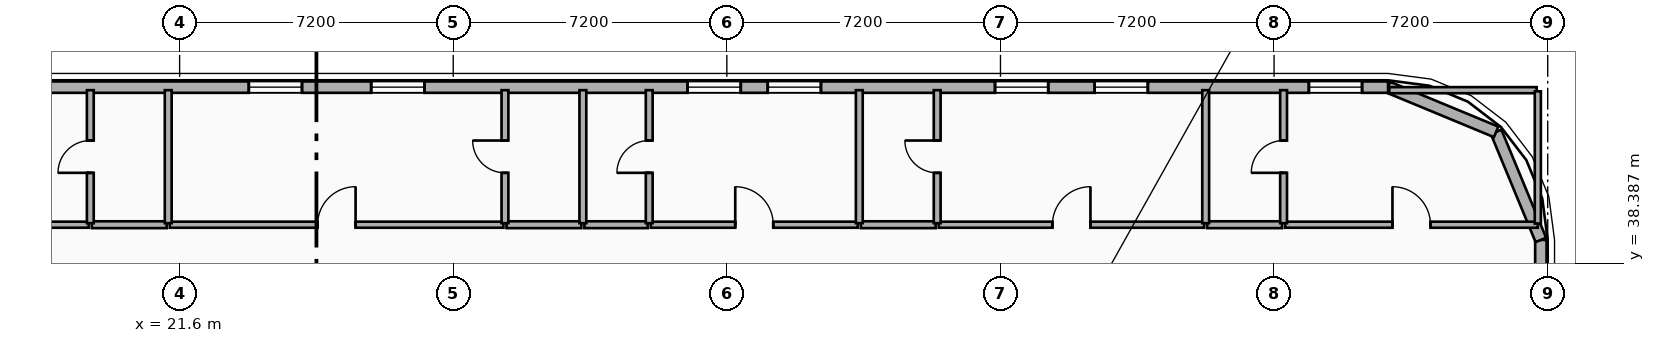
"""IFC4 building model, lengths in metres.
Left out: names, types, materials, properties, quantities, classifications, styles, units other than length and angle.
Written with IfcOpenShell. Run it as: python <this file> out.ifc"""

import sys

from ifc_helpers import new_model, si_unit, direction, frame, frame_2d, origin, place, context, subcontext, project, spatial, rectangle, extrude, element, fill, save


model = new_model("IFC4")
c1 = context("Model", 3, precision=1e-05, world=origin(), true_north=direction((0.0, 1.0)))
c2 = subcontext(c1, "Body", "Model", "MODEL_VIEW")
j1 = project(units=[si_unit("LENGTHUNIT", "METRE"), si_unit("PLANEANGLEUNIT", "RADIAN")], contexts=[c1])
p1 = place(None, origin())
s1 = spatial("IfcSite", under=j1, at=p1, CompositionType="ELEMENT")
p2 = place(p1, origin())
s2 = spatial("IfcBuilding", under=s1, at=p2, CompositionType="ELEMENT")
p3 = place(p2, frame((0.0, 0.0, 111.8)))
s3 = spatial("IfcBuildingStorey", under=s2, at=p3, CompositionType="ELEMENT", Elevation=111.8)
p4 = place(p3, frame((57.42, 39.0, 0.0), z_axis=(0.0, 0.0, 1.0), x_axis=(0.0, -1.0, 0.0)))
e1 = element("IfcWall", 1, at=p4, inside=s3, PredefinedType="SOLIDWALL", context=c2, shape_type="SweptSolid", body=[
    extrude(rectangle(XDim=18.0, YDim=0.3, at=frame_2d((9.0, 0.0))), origin(), (0.0, 0.0, 1.0), 3.24),
])
p5 = place(p4, frame((8.882, 0.0, 0.48)))
e2 = element("IfcOpeningElement", 2, at=p5, cuts=e1, PredefinedType="OPENING", context=c2, shape_type="SweptSolid", body=[
    extrude(rectangle(XDim=1.4, YDim=1.8, at=frame_2d((0.7, 0.9))), frame((0.0, 0.16, 0.0), z_axis=(0.0, -1.0, 0.0), x_axis=(1.0, 0.0, 0.0)), (0.0, 0.0, 1.0), 0.32),
])
p6 = place(p4, frame((3.621, 0.0, 0.48)))
e3 = element("IfcOpeningElement", 3, at=p6, cuts=e1, PredefinedType="OPENING", context=c2, shape_type="SweptSolid", body=[
    extrude(rectangle(XDim=1.4, YDim=1.8, at=frame_2d((0.7, 0.9))), frame((0.0, 0.16, 0.0), z_axis=(0.0, -1.0, 0.0), x_axis=(1.0, 0.0, 0.0)), (0.0, 0.0, 1.0), 0.32),
])
p7 = place(p3, frame((56.243, 41.843, 0.0), z_axis=(0.0, 0.0, 1.0), x_axis=(0.382636798336, -0.92389884758, 0.0)))
e4 = element("IfcWall", 4, at=p7, inside=s3, PredefinedType="SOLIDWALL", context=c2, shape_type="SweptSolid", body=[
    extrude(rectangle(XDim=3.077, YDim=0.3, at=frame_2d((1.538, 0.0))), origin(), (0.0, 0.0, 1.0), 3.24),
])
p8 = place(p3, frame((53.4, 43.02, 0.0), z_axis=(0.0, 0.0, 1.0), x_axis=(0.923882414032, -0.382676475685, 0.0)))
e5 = element("IfcWall", 5, at=p8, inside=s3, PredefinedType="SOLIDWALL", context=c2, shape_type="SweptSolid", body=[
    extrude(rectangle(XDim=3.077, YDim=0.3, at=frame_2d((1.539, 0.0))), origin(), (0.0, 0.0, 1.0), 3.24),
])
p9 = place(p3, frame((4.2, 43.02, 0.0), z_axis=(0.0, 0.0, 1.0), x_axis=(1.0, 0.0, 0.0)))
e6 = element("IfcWall", 6, at=p9, inside=s3, PredefinedType="SOLIDWALL", context=c2, shape_type="SweptSolid", body=[
    extrude(rectangle(XDim=49.2, YDim=0.3, at=frame_2d((24.6, 0.0))), origin(), (0.0, 0.0, 1.0), 3.24),
])
p10 = place(p9, frame((8.09, 0.0, 0.85)))
e7 = element("IfcOpeningElement", 7, at=p10, cuts=e6, PredefinedType="OPENING", context=c2, shape_type="SweptSolid", body=[
    extrude(rectangle(XDim=1.4, YDim=1.8, at=frame_2d((0.7, 0.9))), frame((0.0, 0.16, 0.0), z_axis=(0.0, -1.0, 0.0), x_axis=(1.0, 0.0, 0.0)), (0.0, 0.0, 1.0), 0.32),
])
p11 = place(p9, frame((11.42, 0.0, 0.85)))
e8 = element("IfcOpeningElement", 8, at=p11, cuts=e6, PredefinedType="OPENING", context=c2, shape_type="SweptSolid", body=[
    extrude(rectangle(XDim=1.4, YDim=1.8, at=frame_2d((0.7, 0.9))), frame((0.0, 0.16, 0.0), z_axis=(0.0, -1.0, 0.0), x_axis=(1.0, 0.0, 0.0)), (0.0, 0.0, 1.0), 0.32),
])
p12 = place(p9, frame((19.22, 0.0, 0.85)))
e9 = element("IfcOpeningElement", 9, at=p12, cuts=e6, PredefinedType="OPENING", context=c2, shape_type="SweptSolid", body=[
    extrude(rectangle(XDim=1.4, YDim=1.8, at=frame_2d((0.7, 0.9))), frame((0.0, 0.16, 0.0), z_axis=(0.0, -1.0, 0.0), x_axis=(1.0, 0.0, 0.0)), (0.0, 0.0, 1.0), 0.32),
])
p13 = place(p9, frame((22.441, 0.0, 0.85)))
e10 = element("IfcOpeningElement", 10, at=p13, cuts=e6, PredefinedType="OPENING", context=c2, shape_type="SweptSolid", body=[
    extrude(rectangle(XDim=1.4, YDim=1.8, at=frame_2d((0.7, 0.9))), frame((0.0, 0.16, 0.0), z_axis=(0.0, -1.0, 0.0), x_axis=(1.0, 0.0, 0.0)), (0.0, 0.0, 1.0), 0.32),
])
p14 = place(p9, frame((30.766, 0.0, 0.85)))
e11 = element("IfcOpeningElement", 11, at=p14, cuts=e6, PredefinedType="OPENING", context=c2, shape_type="SweptSolid", body=[
    extrude(rectangle(XDim=1.4, YDim=1.8, at=frame_2d((0.7, 0.9))), frame((0.0, 0.16, 0.0), z_axis=(0.0, -1.0, 0.0), x_axis=(1.0, 0.0, 0.0)), (0.0, 0.0, 1.0), 0.32),
])
p15 = place(p9, frame((32.876, 0.0, 0.85)))
e12 = element("IfcOpeningElement", 12, at=p15, cuts=e6, PredefinedType="OPENING", context=c2, shape_type="SweptSolid", body=[
    extrude(rectangle(XDim=1.4, YDim=1.8, at=frame_2d((0.7, 0.9))), frame((0.0, 0.16, 0.0), z_axis=(0.0, -1.0, 0.0), x_axis=(1.0, 0.0, 0.0)), (0.0, 0.0, 1.0), 0.32),
])
p16 = place(p9, frame((38.857, 0.0, 0.85)))
e13 = element("IfcOpeningElement", 13, at=p16, cuts=e6, PredefinedType="OPENING", context=c2, shape_type="SweptSolid", body=[
    extrude(rectangle(XDim=1.4, YDim=1.8, at=frame_2d((0.7, 0.9))), frame((0.0, 0.16, 0.0), z_axis=(0.0, -1.0, 0.0), x_axis=(1.0, 0.0, 0.0)), (0.0, 0.0, 1.0), 0.32),
])
p17 = place(p9, frame((41.478, 0.0, 0.85)))
e14 = element("IfcOpeningElement", 14, at=p17, cuts=e6, PredefinedType="OPENING", context=c2, shape_type="SweptSolid", body=[
    extrude(rectangle(XDim=1.4, YDim=1.8, at=frame_2d((0.7, 0.9))), frame((0.0, 0.16, 0.0), z_axis=(0.0, -1.0, 0.0), x_axis=(1.0, 0.0, 0.0)), (0.0, 0.0, 1.0), 0.32),
])
p18 = place(p9, frame((47.115, 0.0, 0.85)))
e15 = element("IfcOpeningElement", 15, at=p18, cuts=e6, PredefinedType="OPENING", context=c2, shape_type="SweptSolid", body=[
    extrude(rectangle(XDim=1.4, YDim=1.8, at=frame_2d((0.7, 0.9))), frame((0.0, 0.16, 0.0), z_axis=(0.0, -1.0, 0.0), x_axis=(1.0, 0.0, 0.0)), (0.0, 0.0, 1.0), 0.32),
])
p19 = place(p3, frame((10.1, 39.4, 0.0), z_axis=(0.0, 0.0, 1.0), x_axis=(1.0, 0.0, 0.0)))
e16 = element("IfcWall", 16, at=p19, inside=s3, PredefinedType="PARTITIONING", context=c2, shape_type="SweptSolid", body=[
    extrude(rectangle(XDim=9.11, YDim=0.16, at=frame_2d((4.555, 0.0))), origin(), (0.0, 0.0, 1.0), 3.24),
])
p20 = place(p19, frame((4.055, 0.0, 0.0)))
e17 = element("IfcOpeningElement", 17, at=p20, cuts=e16, PredefinedType="OPENING", context=c2, shape_type="SweptSolid", body=[
    extrude(rectangle(XDim=1.0, YDim=2.15, at=frame_2d((0.5, 1.075))), frame((0.0, 0.09, 0.0), z_axis=(0.0, -1.0, 0.0), x_axis=(1.0, 0.0, 0.0)), (0.0, 0.0, 1.0), 0.18),
])
p21 = place(p3, frame((19.29, 39.4, 0.0), z_axis=(0.0, 0.0, 1.0), x_axis=(1.0, 0.0, 0.0)))
e18 = element("IfcWall", 18, at=p21, inside=s3, PredefinedType="PLUMBINGWALL", context=c2, shape_type="SweptSolid", body=[
    extrude(rectangle(XDim=1.97, YDim=0.18, at=frame_2d((0.985, 0.0))), origin(), (0.0, 0.0, 1.0), 3.24),
])
p22 = place(p3, frame((21.34, 39.4, 0.0), z_axis=(0.0, 0.0, 1.0), x_axis=(1.0, 0.0, 0.0)))
e19 = element("IfcWall", 19, at=p22, inside=s3, PredefinedType="PARTITIONING", context=c2, shape_type="SweptSolid", body=[
    extrude(rectangle(XDim=8.781, YDim=0.16, at=frame_2d((4.391, 0.0))), origin(), (0.0, 0.0, 1.0), 3.24),
])
p23 = place(p22, frame((3.89, 0.0, 0.0)))
e20 = element("IfcOpeningElement", 20, at=p23, cuts=e19, PredefinedType="OPENING", context=c2, shape_type="SweptSolid", body=[
    extrude(rectangle(XDim=1.0, YDim=2.15, at=frame_2d((0.5, 1.075))), frame((0.0, 0.09, 0.0), z_axis=(0.0, -1.0, 0.0), x_axis=(1.0, 0.0, 0.0)), (0.0, 0.0, 1.0), 0.18),
])
p24 = place(p3, frame((30.201, 39.4, 0.0), z_axis=(0.0, 0.0, 1.0), x_axis=(1.0, 0.0, 0.0)))
e21 = element("IfcWall", 21, at=p24, inside=s3, PredefinedType="PLUMBINGWALL", context=c2, shape_type="SweptSolid", body=[
    extrude(rectangle(XDim=1.97, YDim=0.18, at=frame_2d((0.985, 0.0))), origin(), (0.0, 0.0, 1.0), 3.24),
])
p25 = place(p3, frame((33.997, 39.4, 0.0), z_axis=(0.0, 0.0, 1.0), x_axis=(1.0, 0.0, 0.0)))
e22 = element("IfcWall", 22, at=p25, inside=s3, PredefinedType="PARTITIONING", context=c2, shape_type="SweptSolid", body=[
    extrude(rectangle(XDim=5.448, YDim=0.16, at=frame_2d((2.724, 0.0))), origin(), (0.0, 0.0, 1.0), 3.24),
])
p26 = place(p25, frame((2.224, 0.0, 0.0)))
e23 = element("IfcOpeningElement", 23, at=p26, cuts=e22, PredefinedType="OPENING", context=c2, shape_type="SweptSolid", body=[
    extrude(rectangle(XDim=1.0, YDim=2.15, at=frame_2d((0.5, 1.075))), frame((0.0, 0.09, 0.0), z_axis=(0.0, -1.0, 0.0), x_axis=(1.0, 0.0, 0.0)), (0.0, 0.0, 1.0), 0.18),
])
p27 = place(p3, frame((32.251, 39.4, 0.0), z_axis=(0.0, 0.0, 1.0), x_axis=(1.0, 0.0, 0.0)))
e24 = element("IfcWall", 24, at=p27, inside=s3, PredefinedType="PLUMBINGWALL", context=c2, shape_type="SweptSolid", body=[
    extrude(rectangle(XDim=1.666, YDim=0.18, at=frame_2d((0.833, 0.0))), origin(), (0.0, 0.0, 1.0), 3.24),
])
p28 = place(p3, frame((41.575, 39.4, 0.0), z_axis=(0.0, 0.0, 1.0), x_axis=(1.0, 0.0, 0.0)))
e25 = element("IfcWall", 25, at=p28, inside=s3, PredefinedType="PARTITIONING", context=c2, shape_type="SweptSolid", body=[
    extrude(rectangle(XDim=6.985, YDim=0.16, at=frame_2d((3.493, 0.0))), origin(), (0.0, 0.0, 1.0), 3.24),
])
p29 = place(p28, frame((2.992, 0.0, 0.0)))
e26 = element("IfcOpeningElement", 26, at=p29, cuts=e25, PredefinedType="OPENING", context=c2, shape_type="SweptSolid", body=[
    extrude(rectangle(XDim=1.0, YDim=2.15, at=frame_2d((0.5, 1.075))), frame((0.0, 0.09, 0.0), z_axis=(0.0, -1.0, 0.0), x_axis=(1.0, 0.0, 0.0)), (0.0, 0.0, 1.0), 0.18),
])
p30 = place(p3, frame((39.525, 39.4, 0.0), z_axis=(0.0, 0.0, 1.0), x_axis=(1.0, 0.0, 0.0)))
e27 = element("IfcWall", 27, at=p30, inside=s3, PredefinedType="PLUMBINGWALL", context=c2, shape_type="SweptSolid", body=[
    extrude(rectangle(XDim=1.97, YDim=0.18, at=frame_2d((0.985, 0.0))), origin(), (0.0, 0.0, 1.0), 3.24),
])
p31 = place(p3, frame((50.69, 39.4, 0.0), z_axis=(0.0, 0.0, 1.0), x_axis=(1.0, 0.0, 0.0)))
e28 = element("IfcWall", 28, at=p31, inside=s3, PredefinedType="PARTITIONING", context=c2, shape_type="SweptSolid", body=[
    extrude(rectangle(XDim=6.65, YDim=0.16, at=frame_2d((3.325, 0.0))), origin(), (0.0, 0.0, 1.0), 3.24),
])
p32 = place(p31, frame((2.825, 0.0, 0.0)))
e29 = element("IfcOpeningElement", 29, at=p32, cuts=e28, PredefinedType="OPENING", context=c2, shape_type="SweptSolid", body=[
    extrude(rectangle(XDim=1.0, YDim=2.15, at=frame_2d((0.5, 1.075))), frame((0.0, 0.09, 0.0), z_axis=(0.0, -1.0, 0.0), x_axis=(1.0, 0.0, 0.0)), (0.0, 0.0, 1.0), 0.18),
])
p33 = place(p3, frame((48.64, 39.4, 0.0), z_axis=(0.0, 0.0, 1.0), x_axis=(1.0, 0.0, 0.0)))
e30 = element("IfcWall", 30, at=p33, inside=s3, PredefinedType="PLUMBINGWALL", context=c2, shape_type="SweptSolid", body=[
    extrude(rectangle(XDim=1.97, YDim=0.18, at=frame_2d((0.985, 0.0))), origin(), (0.0, 0.0, 1.0), 3.24),
])
p34 = place(p3, frame((19.25, 39.44, 0.0), z_axis=(0.0, 0.0, 1.0), x_axis=(0.0, 1.0, 0.0)))
e31 = element("IfcWall", 31, at=p34, inside=s3, PredefinedType="PLUMBINGWALL", context=c2, shape_type="SweptSolid", body=[
    extrude(rectangle(XDim=3.5, YDim=0.18, at=frame_2d((1.75, 0.0))), origin(), (0.0, 0.0, 1.0), 3.24),
])
p35 = place(p34, frame((1.325, 0.0, 0.0)))
e32 = element("IfcOpeningElement", 32, at=p35, cuts=e31, PredefinedType="OPENING", context=c2, shape_type="SweptSolid", body=[
    extrude(rectangle(XDim=0.85, YDim=2.1, at=frame_2d((0.425, 1.05))), frame((0.0, 0.1, 0.0), z_axis=(0.0, -1.0, 0.0), x_axis=(1.0, 0.0, 0.0)), (0.0, 0.0, 1.0), 0.2),
])
p36 = place(p3, frame((21.3, 39.44, 0.0), z_axis=(0.0, 0.0, 1.0), x_axis=(0.0, 1.0, 0.0)))
e33 = element("IfcWall", 33, at=p36, inside=s3, PredefinedType="PLUMBINGWALL", context=c2, shape_type="SweptSolid", body=[
    extrude(rectangle(XDim=3.5, YDim=0.18, at=frame_2d((1.75, 0.0))), origin(), (0.0, 0.0, 1.0), 3.24),
])
p37 = place(p3, frame((30.161, 39.44, 0.0), z_axis=(0.0, 0.0, 1.0), x_axis=(0.0, 1.0, 0.0)))
e34 = element("IfcWall", 34, at=p37, inside=s3, PredefinedType="PLUMBINGWALL", context=c2, shape_type="SweptSolid", body=[
    extrude(rectangle(XDim=3.5, YDim=0.18, at=frame_2d((1.75, 0.0))), origin(), (0.0, 0.0, 1.0), 3.24),
])
p38 = place(p37, frame((1.325, 0.0, 0.0)))
e35 = element("IfcOpeningElement", 35, at=p38, cuts=e34, PredefinedType="OPENING", context=c2, shape_type="SweptSolid", body=[
    extrude(rectangle(XDim=0.85, YDim=2.1, at=frame_2d((0.425, 1.05))), frame((0.0, 0.1, 0.0), z_axis=(0.0, -1.0, 0.0), x_axis=(1.0, 0.0, 0.0)), (0.0, 0.0, 1.0), 0.2),
])
p39 = place(p3, frame((32.211, 39.44, 0.0), z_axis=(0.0, 0.0, 1.0), x_axis=(0.0, 1.0, 0.0)))
e36 = element("IfcWall", 36, at=p39, inside=s3, PredefinedType="PLUMBINGWALL", context=c2, shape_type="SweptSolid", body=[
    extrude(rectangle(XDim=3.5, YDim=0.18, at=frame_2d((1.75, 0.0))), origin(), (0.0, 0.0, 1.0), 3.24),
])
p40 = place(p3, frame((33.957, 39.44, 0.0), z_axis=(0.0, 0.0, 1.0), x_axis=(0.0, 1.0, 0.0)))
e37 = element("IfcWall", 37, at=p40, inside=s3, PredefinedType="PLUMBINGWALL", context=c2, shape_type="SweptSolid", body=[
    extrude(rectangle(XDim=3.5, YDim=0.18, at=frame_2d((1.75, 0.0))), origin(), (0.0, 0.0, 1.0), 3.24),
])
p41 = place(p40, frame((1.325, 0.0, 0.0)))
e38 = element("IfcOpeningElement", 38, at=p41, cuts=e37, PredefinedType="OPENING", context=c2, shape_type="SweptSolid", body=[
    extrude(rectangle(XDim=0.85, YDim=2.1, at=frame_2d((0.425, 1.05))), frame((0.0, 0.1, 0.0), z_axis=(0.0, -1.0, 0.0), x_axis=(1.0, 0.0, 0.0)), (0.0, 0.0, 1.0), 0.2),
])
p42 = place(p3, frame((39.485, 39.44, 0.0), z_axis=(0.0, 0.0, 1.0), x_axis=(0.0, 1.0, 0.0)))
e39 = element("IfcWall", 39, at=p42, inside=s3, PredefinedType="PLUMBINGWALL", context=c2, shape_type="SweptSolid", body=[
    extrude(rectangle(XDim=3.5, YDim=0.18, at=frame_2d((1.75, 0.0))), origin(), (0.0, 0.0, 1.0), 3.24),
])
p43 = place(p3, frame((41.535, 39.44, 0.0), z_axis=(0.0, 0.0, 1.0), x_axis=(0.0, 1.0, 0.0)))
e40 = element("IfcWall", 40, at=p43, inside=s3, PredefinedType="PLUMBINGWALL", context=c2, shape_type="SweptSolid", body=[
    extrude(rectangle(XDim=3.5, YDim=0.18, at=frame_2d((1.75, 0.0))), origin(), (0.0, 0.0, 1.0), 3.24),
])
p44 = place(p43, frame((1.325, 0.0, 0.0)))
e41 = element("IfcOpeningElement", 41, at=p44, cuts=e40, PredefinedType="OPENING", context=c2, shape_type="SweptSolid", body=[
    extrude(rectangle(XDim=0.85, YDim=2.1, at=frame_2d((0.425, 1.05))), frame((0.0, 0.1, 0.0), z_axis=(0.0, -1.0, 0.0), x_axis=(1.0, 0.0, 0.0)), (0.0, 0.0, 1.0), 0.2),
])
p45 = place(p3, frame((48.6, 39.44, 0.0), z_axis=(0.0, 0.0, 1.0), x_axis=(0.0, 1.0, 0.0)))
e42 = element("IfcWall", 42, at=p45, inside=s3, PredefinedType="PLUMBINGWALL", context=c2, shape_type="SweptSolid", body=[
    extrude(rectangle(XDim=3.5, YDim=0.18, at=frame_2d((1.75, 0.0))), origin(), (0.0, 0.0, 1.0), 3.24),
])
p46 = place(p3, frame((50.65, 39.44, 0.0), z_axis=(0.0, 0.0, 1.0), x_axis=(0.0, 1.0, 0.0)))
e43 = element("IfcWall", 43, at=p46, inside=s3, PredefinedType="PLUMBINGWALL", context=c2, shape_type="SweptSolid", body=[
    extrude(rectangle(XDim=3.5, YDim=0.18, at=frame_2d((1.75, 0.0))), origin(), (0.0, 0.0, 1.0), 3.24),
])
p47 = place(p46, frame((1.325, 0.0, 0.0)))
e44 = element("IfcOpeningElement", 44, at=p47, cuts=e43, PredefinedType="OPENING", context=c2, shape_type="SweptSolid", body=[
    extrude(rectangle(XDim=0.85, YDim=2.1, at=frame_2d((0.425, 1.05))), frame((0.0, 0.1, 0.0), z_axis=(0.0, -1.0, 0.0), x_axis=(1.0, 0.0, 0.0)), (0.0, 0.0, 1.0), 0.2),
])
p48 = place(p3, frame((53.43, 42.94, 0.0), z_axis=(0.0, 0.0, 1.0), x_axis=(1.0, 0.0, 0.0)))
e45 = element("IfcWall", 45, at=p48, inside=s3, PredefinedType="PARTITIONING", context=c2, shape_type="SweptSolid", body=[
    extrude(rectangle(XDim=3.88, YDim=0.16, at=frame_2d((1.94, 0.0))), origin(), (0.0, 0.0, 1.0), 3.24),
])
p49 = place(p3, frame((57.34, 39.43, 0.0), z_axis=(0.0, 0.0, 1.0), x_axis=(0.0, 1.0, 0.0)))
e46 = element("IfcWall", 46, at=p49, inside=s3, PredefinedType="PARTITIONING", context=c2, shape_type="SweptSolid", body=[
    extrude(rectangle(XDim=3.48, YDim=0.16, at=frame_2d((1.74, 0.0))), origin(), (0.0, 0.0, 1.0), 3.24),
])
p50 = place(p12, origin())
e47 = element("IfcWindow", 47, at=p50, inside=s3, PartitioningType="SINGLE_PANEL", PredefinedType="WINDOW", context=c2, shape_type="SweptSolid", body=[
    extrude(rectangle(XDim=1.4, YDim=1.8, at=frame_2d((0.7, 0.9))), frame((0.0, 0.03, 0.0), z_axis=(0.0, -1.0, 0.0), x_axis=(1.0, 0.0, 0.0)), (0.0, 0.0, 1.0), 0.06),
])
fill(e9, e47)
p51 = place(p13, origin())
e48 = element("IfcWindow", 48, at=p51, inside=s3, PartitioningType="SINGLE_PANEL", PredefinedType="WINDOW", context=c2, shape_type="SweptSolid", body=[
    extrude(rectangle(XDim=1.4, YDim=1.8, at=frame_2d((0.7, 0.9))), frame((0.0, 0.03, 0.0), z_axis=(0.0, -1.0, 0.0), x_axis=(1.0, 0.0, 0.0)), (0.0, 0.0, 1.0), 0.06),
])
fill(e10, e48)
p52 = place(p14, origin())
e49 = element("IfcWindow", 49, at=p52, inside=s3, PartitioningType="SINGLE_PANEL", PredefinedType="WINDOW", context=c2, shape_type="SweptSolid", body=[
    extrude(rectangle(XDim=1.4, YDim=1.8, at=frame_2d((0.7, 0.9))), frame((0.0, 0.03, 0.0), z_axis=(0.0, -1.0, 0.0), x_axis=(1.0, 0.0, 0.0)), (0.0, 0.0, 1.0), 0.06),
])
fill(e11, e49)
p53 = place(p15, origin())
e50 = element("IfcWindow", 50, at=p53, inside=s3, PartitioningType="SINGLE_PANEL", PredefinedType="WINDOW", context=c2, shape_type="SweptSolid", body=[
    extrude(rectangle(XDim=1.4, YDim=1.8, at=frame_2d((0.7, 0.9))), frame((0.0, 0.03, 0.0), z_axis=(0.0, -1.0, 0.0), x_axis=(1.0, 0.0, 0.0)), (0.0, 0.0, 1.0), 0.06),
])
fill(e12, e50)
p54 = place(p16, origin())
e51 = element("IfcWindow", 51, at=p54, inside=s3, PartitioningType="SINGLE_PANEL", PredefinedType="WINDOW", context=c2, shape_type="SweptSolid", body=[
    extrude(rectangle(XDim=1.4, YDim=1.8, at=frame_2d((0.7, 0.9))), frame((0.0, 0.03, 0.0), z_axis=(0.0, -1.0, 0.0), x_axis=(1.0, 0.0, 0.0)), (0.0, 0.0, 1.0), 0.06),
])
fill(e13, e51)
p55 = place(p17, origin())
e52 = element("IfcWindow", 52, at=p55, inside=s3, PartitioningType="SINGLE_PANEL", PredefinedType="WINDOW", context=c2, shape_type="SweptSolid", body=[
    extrude(rectangle(XDim=1.4, YDim=1.8, at=frame_2d((0.7, 0.9))), frame((0.0, 0.03, 0.0), z_axis=(0.0, -1.0, 0.0), x_axis=(1.0, 0.0, 0.0)), (0.0, 0.0, 1.0), 0.06),
])
fill(e14, e52)
p56 = place(p18, origin())
e53 = element("IfcWindow", 53, at=p56, inside=s3, PartitioningType="SINGLE_PANEL", PredefinedType="WINDOW", context=c2, shape_type="SweptSolid", body=[
    extrude(rectangle(XDim=1.4, YDim=1.8, at=frame_2d((0.7, 0.9))), frame((0.0, 0.03, 0.0), z_axis=(0.0, -1.0, 0.0), x_axis=(1.0, 0.0, 0.0)), (0.0, 0.0, 1.0), 0.06),
])
fill(e15, e53)
p57 = place(p23, origin())
e54 = element("IfcDoor", 54, at=p57, inside=s3, OperationType="SINGLE_SWING_RIGHT", PredefinedType="DOOR", context=c2, shape_type="SweptSolid", body=[
    extrude(rectangle(XDim=1.0, YDim=2.15, at=frame_2d((0.5, 1.075))), frame((0.0, 0.025, 0.0), z_axis=(0.0, -1.0, 0.0), x_axis=(1.0, 0.0, 0.0)), (0.0, 0.0, 1.0), 0.05),
])
fill(e20, e54)
p58 = place(p26, origin())
e55 = element("IfcDoor", 55, at=p58, inside=s3, OperationType="SINGLE_SWING_LEFT", PredefinedType="DOOR", context=c2, shape_type="SweptSolid", body=[
    extrude(rectangle(XDim=1.0, YDim=2.15, at=frame_2d((0.5, 1.075))), frame((0.0, 0.025, 0.0), z_axis=(0.0, -1.0, 0.0), x_axis=(1.0, 0.0, 0.0)), (0.0, 0.0, 1.0), 0.05),
])
fill(e23, e55)
p59 = place(p29, origin())
e56 = element("IfcDoor", 56, at=p59, inside=s3, OperationType="SINGLE_SWING_RIGHT", PredefinedType="DOOR", context=c2, shape_type="SweptSolid", body=[
    extrude(rectangle(XDim=1.0, YDim=2.15, at=frame_2d((0.5, 1.075))), frame((0.0, 0.025, 0.0), z_axis=(0.0, -1.0, 0.0), x_axis=(1.0, 0.0, 0.0)), (0.0, 0.0, 1.0), 0.05),
])
fill(e26, e56)
p60 = place(p32, origin())
e57 = element("IfcDoor", 57, at=p60, inside=s3, OperationType="SINGLE_SWING_LEFT", PredefinedType="DOOR", context=c2, shape_type="SweptSolid", body=[
    extrude(rectangle(XDim=1.0, YDim=2.15, at=frame_2d((0.5, 1.075))), frame((0.0, 0.025, 0.0), z_axis=(0.0, -1.0, 0.0), x_axis=(1.0, 0.0, 0.0)), (0.0, 0.0, 1.0), 0.05),
])
fill(e29, e57)
p61 = place(p35, origin())
e58 = element("IfcDoor", 58, at=p61, inside=s3, OperationType="SINGLE_SWING_LEFT", PredefinedType="DOOR", context=c2, shape_type="SweptSolid", body=[
    extrude(rectangle(XDim=0.85, YDim=2.1, at=frame_2d((0.425, 1.05))), frame((0.0, 0.025, 0.0), z_axis=(0.0, -1.0, 0.0), x_axis=(1.0, 0.0, 0.0)), (0.0, 0.0, 1.0), 0.05),
])
fill(e32, e58)
p62 = place(p38, origin())
e59 = element("IfcDoor", 59, at=p62, inside=s3, OperationType="SINGLE_SWING_RIGHT", PredefinedType="DOOR", context=c2, shape_type="SweptSolid", body=[
    extrude(rectangle(XDim=0.85, YDim=2.1, at=frame_2d((0.425, 1.05))), frame((0.0, 0.025, 0.0), z_axis=(0.0, -1.0, 0.0), x_axis=(1.0, 0.0, 0.0)), (0.0, 0.0, 1.0), 0.05),
])
fill(e35, e59)
p63 = place(p41, origin())
e60 = element("IfcDoor", 60, at=p63, inside=s3, OperationType="SINGLE_SWING_LEFT", PredefinedType="DOOR", context=c2, shape_type="SweptSolid", body=[
    extrude(rectangle(XDim=0.85, YDim=2.1, at=frame_2d((0.425, 1.05))), frame((0.0, 0.025, 0.0), z_axis=(0.0, -1.0, 0.0), x_axis=(1.0, 0.0, 0.0)), (0.0, 0.0, 1.0), 0.05),
])
fill(e38, e60)
p64 = place(p44, origin())
e61 = element("IfcDoor", 61, at=p64, inside=s3, OperationType="SINGLE_SWING_RIGHT", PredefinedType="DOOR", context=c2, shape_type="SweptSolid", body=[
    extrude(rectangle(XDim=0.85, YDim=2.1, at=frame_2d((0.425, 1.05))), frame((0.0, 0.025, 0.0), z_axis=(0.0, -1.0, 0.0), x_axis=(1.0, 0.0, 0.0)), (0.0, 0.0, 1.0), 0.05),
])
fill(e41, e61)
p65 = place(p47, origin())
e62 = element("IfcDoor", 62, at=p65, inside=s3, OperationType="SINGLE_SWING_LEFT", PredefinedType="DOOR", context=c2, shape_type="SweptSolid", body=[
    extrude(rectangle(XDim=0.85, YDim=2.1, at=frame_2d((0.425, 1.05))), frame((0.0, 0.025, 0.0), z_axis=(0.0, -1.0, 0.0), x_axis=(1.0, 0.0, 0.0)), (0.0, 0.0, 1.0), 0.05),
])
fill(e44, e62)
save(model, sys.argv[1])
